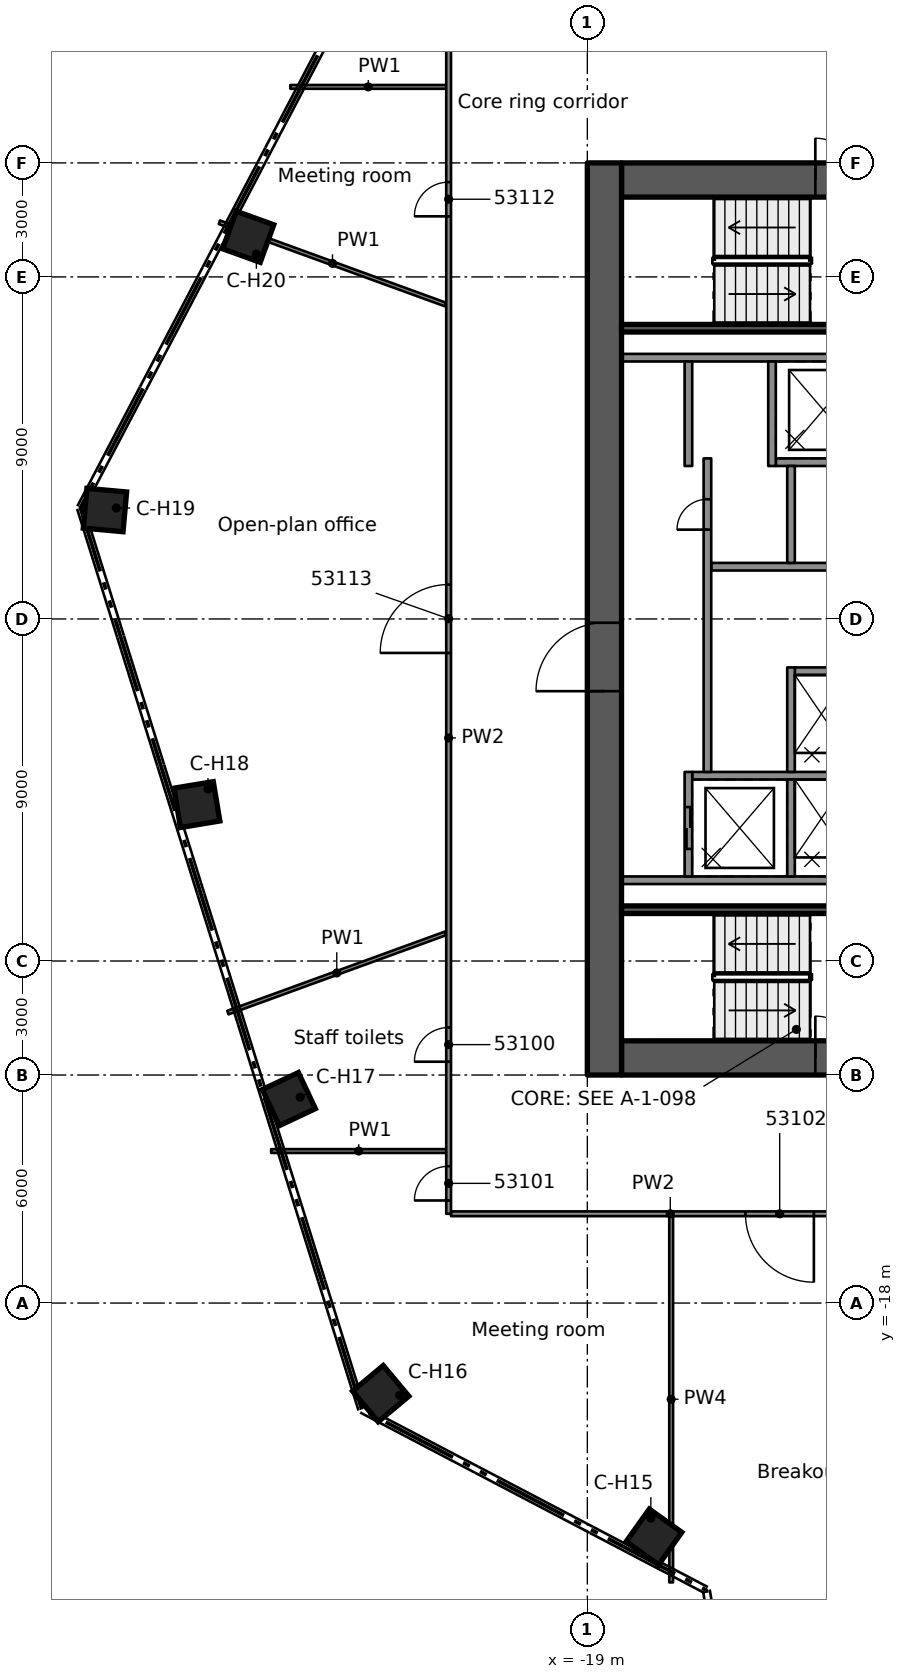
"""IFC4 building model, lengths in metres.
Left out: names, types, materials, properties, quantities, classifications, styles, units other than length and angle.
Written with IfcOpenShell. Run it as: python <this file> out.ifc"""

import sys

from ifc_helpers import new_model, si_unit, direction, frame, frame_2d, origin, origin_2d, place, context, subcontext, project, spatial, rectangle, extrude, element, fill, save


model = new_model("IFC4")
c1 = context("Model", 3, precision=1e-05, world=origin(), true_north=direction((0.0, 1.0)))
c2 = subcontext(c1, "Body", "Model", "MODEL_VIEW")
j1 = project(units=[si_unit("LENGTHUNIT", "METRE"), si_unit("PLANEANGLEUNIT", "RADIAN")], contexts=[c1])
p1 = place(None, origin())
s1 = spatial("IfcSite", under=j1, at=p1, CompositionType="ELEMENT")
p2 = place(p1, origin())
s2 = spatial("IfcBuilding", under=s1, at=p2, CompositionType="ELEMENT")
p3 = place(p2, frame((0.0, 0.0, 267.5)))
s3 = spatial("IfcBuildingStorey", under=s2, at=p3, CompositionType="ELEMENT", Elevation=267.5)
p4 = place(p3, frame((-18.1, 11.55, 0.0), z_axis=(0.0, 0.0, 1.0), x_axis=(1.0, 0.0, 0.0)))
e1 = element("IfcWall", 1, at=p4, inside=s3, PredefinedType="SHEAR", context=c2, shape_type="SweptSolid", body=[
    extrude(rectangle(XDim=9.2, YDim=0.9, at=frame_2d((4.6, 0.0))), origin(), (0.0, 0.0, 1.0), 3.5),
])
p5 = place(p4, frame((7.25, 0.0, 0.0)))
e2 = element("IfcOpeningElement", 2, at=p5, cuts=e1, PredefinedType="OPENING", context=c2, shape_type="SweptSolid", body=[
    extrude(rectangle(XDim=1.1, YDim=2.1, at=frame_2d((0.55, 1.05))), frame((0.0, 0.46, 0.0), z_axis=(0.0, -1.0, 0.0), x_axis=(1.0, 0.0, 0.0)), (0.0, 0.0, 1.0), 0.92),
])
p6 = place(p4, frame((5.1, 0.0, 0.0)))
e3 = element("IfcOpeningElement", 3, at=p6, cuts=e1, PredefinedType="OPENING", context=c2, shape_type="SweptSolid", body=[
    extrude(rectangle(XDim=1.1, YDim=2.1, at=frame_2d((0.55, 1.05))), frame((0.0, 0.46, 0.0), z_axis=(0.0, -1.0, 0.0), x_axis=(1.0, 0.0, 0.0)), (0.0, 0.0, 1.0), 0.92),
])
p7 = place(p3, frame((-18.1, -11.55, 0.0), z_axis=(0.0, 0.0, 1.0), x_axis=(1.0, 0.0, 0.0)))
e4 = element("IfcWall", 4, at=p7, inside=s3, PredefinedType="SHEAR", context=c2, shape_type="SweptSolid", body=[
    extrude(rectangle(XDim=9.2, YDim=0.9, at=frame_2d((4.6, 0.0))), origin(), (0.0, 0.0, 1.0), 3.5),
])
p8 = place(p7, frame((6.9, 0.0, 0.0)))
e5 = element("IfcOpeningElement", 5, at=p8, cuts=e4, PredefinedType="OPENING", context=c2, shape_type="SweptSolid", body=[
    extrude(rectangle(XDim=1.8, YDim=2.1, at=frame_2d((0.9, 1.05))), frame((0.0, 0.46, 0.0), z_axis=(0.0, -1.0, 0.0), x_axis=(1.0, 0.0, 0.0)), (0.0, 0.0, 1.0), 0.92),
])
p9 = place(p7, frame((5.1, 0.0, 0.0)))
e6 = element("IfcOpeningElement", 6, at=p9, cuts=e4, PredefinedType="OPENING", context=c2, shape_type="SweptSolid", body=[
    extrude(rectangle(XDim=1.1, YDim=2.1, at=frame_2d((0.55, 1.05))), frame((0.0, 0.46, 0.0), z_axis=(0.0, -1.0, 0.0), x_axis=(1.0, 0.0, 0.0)), (0.0, 0.0, 1.0), 0.92),
])
p10 = place(p3, frame((-18.55, -12.0, 0.0), z_axis=(0.0, 0.0, 1.0), x_axis=(0.0, 1.0, 0.0)))
e7 = element("IfcWall", 7, at=p10, inside=s3, PredefinedType="SHEAR", context=c2, shape_type="SweptSolid", body=[
    extrude(rectangle(XDim=24.0, YDim=0.9, at=frame_2d((12.0, 0.0))), origin(), (0.0, 0.0, 1.0), 3.5),
])
p11 = place(p10, frame((10.1, 0.0, 0.0)))
e8 = element("IfcOpeningElement", 8, at=p11, cuts=e7, PredefinedType="OPENING", context=c2, shape_type="SweptSolid", body=[
    extrude(rectangle(XDim=1.8, YDim=2.1, at=frame_2d((0.9, 1.05))), frame((0.0, 0.46, 0.0), z_axis=(0.0, -1.0, 0.0), x_axis=(1.0, 0.0, 0.0)), (0.0, 0.0, 1.0), 0.92),
])
for number, where, z_axis, x_axis in (
    (9, (-17.246, -24.154, 0.0), (0.0, 0.0, 1.0), (-0.581, -0.814, 0.0)),
    (10, (-24.437, -20.384, 0.0), (0.0, 0.0, 1.0), (-0.768, -0.641, 0.0)),
    (11, (-26.855, -12.634, 0.0), (0.0, 0.0, 1.0), (-0.905, -0.426, 0.0)),
    (12, (-29.274, -4.884, 0.0), (0.0, 0.0, 1.0), (-0.986, -0.165, 0.0)),
    (13, (-31.693, 2.866, 0.0), (0.0, 0.0, 1.0), (-0.996, 0.09, 0.0)),
    (14, (-27.923, 10.056, 0.0), (0.0, 0.0, 1.0), (-0.941, 0.339, 0.0)),
):
    element("IfcColumn", number, at=place(p3, frame(where, z_axis=z_axis, x_axis=x_axis)), inside=s3, PredefinedType="COLUMN", context=c2, shape_type="SweptSolid", body=[
        extrude(rectangle(XDim=1.05, YDim=1.05, at=origin_2d()), origin(), (0.0, 0.0, 1.0), 3.5),
    ])
for number, where, z_axis, x_axis in (
    (15, (-11.54, 6.875, 0.0), (0.0, 0.0, 1.0), (-1.0, 0.0, 0.0)),
    (16, (-11.54, -6.875, 0.0), (0.0, 0.0, 1.0), (-1.0, 0.0, 0.0)),
):
    element("IfcWall", number, at=place(p3, frame(where, z_axis=z_axis, x_axis=x_axis)), inside=s3, PredefinedType="SOLIDWALL", context=c2, shape_type="SweptSolid", body=[
        extrude(rectangle(XDim=6.56, YDim=0.2, at=frame_2d((3.28, 0.0))), origin(), (0.0, 0.0, 1.0), 3.05),
    ])
p12 = place(p3, frame((-11.54, -4.125, 0.0), z_axis=(0.0, 0.0, 1.0), x_axis=(-1.0, 0.0, 0.0)))
e17 = element("IfcWall", 17, at=p12, inside=s3, PredefinedType="SOLIDWALL", context=c2, shape_type="SweptSolid", body=[
    extrude(rectangle(XDim=4.7, YDim=0.2, at=frame_2d((2.35, 0.0))), origin(), (0.0, 0.0, 1.0), 3.05),
])
p13 = place(p3, frame((-11.54, -1.375, 0.0), z_axis=(0.0, 0.0, 1.0), x_axis=(-1.0, 0.0, 0.0)))
e18 = element("IfcWall", 18, at=p13, inside=s3, PredefinedType="SOLIDWALL", context=c2, shape_type="SweptSolid", body=[
    extrude(rectangle(XDim=2.0, YDim=0.2, at=frame_2d((1.0, 0.0))), origin(), (0.0, 0.0, 1.0), 3.05),
])
p14 = place(p3, frame((-11.54, 1.375, 0.0), z_axis=(0.0, 0.0, 1.0), x_axis=(-1.0, 0.0, 0.0)))
e19 = element("IfcWall", 19, at=p14, inside=s3, PredefinedType="SOLIDWALL", context=c2, shape_type="SweptSolid", body=[
    extrude(rectangle(XDim=4.2, YDim=0.2, at=frame_2d((2.1, 0.0))), origin(), (0.0, 0.0, 1.0), 3.05),
])
p15 = place(p3, frame((-11.54, 4.125, 0.0), z_axis=(0.0, 0.0, 1.0), x_axis=(-1.0, 0.0, 0.0)))
e20 = element("IfcWall", 20, at=p15, inside=s3, PredefinedType="SOLIDWALL", context=c2, shape_type="SweptSolid", body=[
    extrude(rectangle(XDim=2.5, YDim=0.2, at=frame_2d((1.25, 0.0))), origin(), (0.0, 0.0, 1.0), 3.05),
])
p16 = place(p3, frame((-13.64, -6.775, 0.0), z_axis=(0.0, 0.0, 1.0), x_axis=(0.0, 1.0, 0.0)))
e21 = element("IfcWall", 21, at=p16, inside=s3, PredefinedType="SOLIDWALL", context=c2, shape_type="SweptSolid", body=[
    extrude(rectangle(XDim=2.55, YDim=0.2, at=frame_2d((1.275, 0.0))), origin(), (0.0, 0.0, 1.0), 3.05),
])
p17 = place(p3, frame((-13.64, -4.025, 0.0), z_axis=(0.0, 0.0, 1.0), x_axis=(0.0, 1.0, 0.0)))
e22 = element("IfcWall", 22, at=p17, inside=s3, PredefinedType="SOLIDWALL", context=c2, shape_type="SweptSolid", body=[
    extrude(rectangle(XDim=2.75, YDim=0.2, at=frame_2d((1.375, 0.0))), origin(), (0.0, 0.0, 1.0), 3.05),
])
p18 = place(p3, frame((-13.64, 1.475, 0.0), z_axis=(0.0, 0.0, 1.0), x_axis=(0.0, 1.0, 0.0)))
e23 = element("IfcWall", 23, at=p18, inside=s3, PredefinedType="SOLIDWALL", context=c2, shape_type="SweptSolid", body=[
    extrude(rectangle(XDim=2.55, YDim=0.2, at=frame_2d((1.275, 0.0))), origin(), (0.0, 0.0, 1.0), 3.05),
])
p19 = place(p3, frame((-14.14, 4.025, 0.0), z_axis=(0.0, 0.0, 1.0), x_axis=(0.0, 1.0, 0.0)))
e24 = element("IfcWall", 24, at=p19, inside=s3, PredefinedType="SOLIDWALL", context=c2, shape_type="SweptSolid", body=[
    extrude(rectangle(XDim=2.75, YDim=0.2, at=frame_2d((1.375, 0.0))), origin(), (0.0, 0.0, 1.0), 3.05),
])
p20 = place(p3, frame((-16.34, -6.775, 0.0), z_axis=(0.0, 0.0, 1.0), x_axis=(0.0, 1.0, 0.0)))
e25 = element("IfcWall", 25, at=p20, inside=s3, PredefinedType="SOLIDWALL", context=c2, shape_type="SweptSolid", body=[
    extrude(rectangle(XDim=2.75, YDim=0.2, at=frame_2d((1.375, 0.0))), origin(), (0.0, 0.0, 1.0), 3.05),
])
p21 = place(p20, frame((0.725, 0.0, 0.0)))
e26 = element("IfcOpeningElement", 26, at=p21, cuts=e25, PredefinedType="OPENING", context=c2, shape_type="SweptSolid", body=[
    extrude(rectangle(XDim=1.1, YDim=2.1, at=frame_2d((0.55, 1.05))), frame((0.0, 0.11, 0.0), z_axis=(0.0, -1.0, 0.0), x_axis=(1.0, 0.0, 0.0)), (0.0, 0.0, 1.0), 0.22),
])
p22 = place(p3, frame((-15.84, -4.025, 0.0), z_axis=(0.0, 0.0, 1.0), x_axis=(0.0, 1.0, 0.0)))
e27 = element("IfcWall", 27, at=p22, inside=s3, PredefinedType="SOLIDWALL", context=c2, shape_type="SweptSolid", body=[
    extrude(rectangle(XDim=8.25, YDim=0.2, at=frame_2d((4.125, 0.0))), origin(), (0.0, 0.0, 1.0), 3.05),
])
p23 = place(p22, frame((6.375, 0.0, 0.0)))
e28 = element("IfcOpeningElement", 28, at=p23, cuts=e27, PredefinedType="OPENING", context=c2, shape_type="SweptSolid", body=[
    extrude(rectangle(XDim=0.8, YDim=2.1, at=frame_2d((0.4, 1.05))), frame((0.0, 0.11, 0.0), z_axis=(0.0, -1.0, 0.0), x_axis=(1.0, 0.0, 0.0)), (0.0, 0.0, 1.0), 0.22),
])
p24 = place(p3, frame((-16.34, 4.025, 0.0), z_axis=(0.0, 0.0, 1.0), x_axis=(0.0, 1.0, 0.0)))
e29 = element("IfcWall", 29, at=p24, inside=s3, PredefinedType="SOLIDWALL", context=c2, shape_type="SweptSolid", body=[
    extrude(rectangle(XDim=2.75, YDim=0.2, at=frame_2d((1.375, 0.0))), origin(), (0.0, 0.0, 1.0), 3.05),
])
for number, where, z_axis, x_axis in (
    (30, (-11.54, 7.65, 0.0), (0.0, 0.0, 1.0), (-1.0, 0.0, 0.0)),
    (31, (-11.54, -7.65, 0.0), (0.0, 0.0, 1.0), (-1.0, 0.0, 0.0)),
):
    element("IfcWall", number, at=place(p3, frame(where, z_axis=z_axis, x_axis=x_axis)), inside=s3, PredefinedType="SOLIDWALL", context=c2, shape_type="SweptSolid", body=[
        extrude(rectangle(XDim=6.56, YDim=0.2, at=frame_2d((3.28, 0.0))), origin(), (0.0, 0.0, 1.0), 3.05),
    ])
p25 = place(p3, frame((-28.682, 10.439, 0.0), z_axis=(0.0, 0.0, 1.0), x_axis=(0.939707861785, -0.341978266121, 0.0)))
e32 = element("IfcWall", 32, at=p25, inside=s3, PredefinedType="PARTITIONING", context=c2, shape_type="SweptSolid", body=[
    extrude(rectangle(XDim=6.334, YDim=0.1, at=frame_2d((3.167, 0.0))), origin(), (0.0, 0.0, 1.0), 3.03),
])
p26 = place(p3, frame((-11.047, -15.651, 0.0), z_axis=(0.0, 0.0, 1.0), x_axis=(-1.0, 0.0, 0.0)))
e33 = element("IfcWall", 33, at=p26, inside=s3, PredefinedType="PARTITIONING", context=c2, shape_type="SweptSolid", body=[
    extrude(rectangle(XDim=11.54, YDim=0.125, at=frame_2d((5.77, 0.0))), origin(), (0.0, 0.0, 1.0), 3.03),
])
p27 = place(p26, frame((1.992, 0.0, 0.0)))
e34 = element("IfcOpeningElement", 34, at=p27, cuts=e33, PredefinedType="OPENING", context=c2, shape_type="SweptSolid", body=[
    extrude(rectangle(XDim=1.8, YDim=2.1, at=frame_2d((0.9, 1.05))), frame((0.0, 0.073, 0.0), z_axis=(0.0, -1.0, 0.0), x_axis=(1.0, 0.0, 0.0)), (0.0, 0.0, 1.0), 0.145),
])
p28 = place(p3, frame((-27.32, -14.0, 0.0), z_axis=(0.0, 0.0, 1.0), x_axis=(1.0, 0.0, 0.0)))
e35 = element("IfcWall", 35, at=p28, inside=s3, PredefinedType="PARTITIONING", context=c2, shape_type="SweptSolid", body=[
    extrude(rectangle(XDim=4.608, YDim=0.1, at=frame_2d((2.304, 0.0))), origin(), (0.0, 0.0, 1.0), 3.03),
])
p29 = place(p3, frame((-26.815, 14.0, 0.0), z_axis=(0.0, 0.0, 1.0), x_axis=(1.0, 0.0, 0.0)))
e36 = element("IfcWall", 36, at=p29, inside=s3, PredefinedType="PARTITIONING", context=c2, shape_type="SweptSolid", body=[
    extrude(rectangle(XDim=4.103, YDim=0.1, at=frame_2d((2.052, 0.0))), origin(), (0.0, 0.0, 1.0), 3.03),
])
p30 = place(p3, frame((-28.457, -10.357, 0.0), z_axis=(0.0, 0.0, 1.0), x_axis=(0.939718545013, 0.341948908698, 0.0)))
e37 = element("IfcWall", 37, at=p30, inside=s3, PredefinedType="PARTITIONING", context=c2, shape_type="SweptSolid", body=[
    extrude(rectangle(XDim=6.094, YDim=0.1, at=frame_2d((3.047, 0.0))), origin(), (0.0, 0.0, 1.0), 3.03),
])
p31 = place(p3, frame((-16.794, -25.35, 0.0), z_axis=(0.0, 0.0, 1.0), x_axis=(0.0, 1.0, 0.0)))
e38 = element("IfcWall", 38, at=p31, inside=s3, PredefinedType="PARTITIONING", context=c2, shape_type="SweptSolid", body=[
    extrude(rectangle(XDim=9.637, YDim=0.1, at=frame_2d((4.819, 0.0))), origin(), (0.0, 0.0, 1.0), 2.419),
])
p32 = place(p3, frame((-22.65, -15.651, 0.0), z_axis=(0.0, 0.0, 1.0), x_axis=(0.0, 1.0, 0.0)))
e39 = element("IfcWall", 39, at=p32, inside=s3, PredefinedType="PARTITIONING", context=c2, shape_type="SweptSolid", body=[
    extrude(rectangle(XDim=31.302, YDim=0.125, at=frame_2d((15.651, 0.0))), origin(), (0.0, 0.0, 1.0), 3.03),
])
p33 = place(p32, frame((4.001, 0.0, 0.0)))
e40 = element("IfcOpeningElement", 40, at=p33, cuts=e39, PredefinedType="OPENING", context=c2, shape_type="SweptSolid", body=[
    extrude(rectangle(XDim=0.9, YDim=2.1, at=frame_2d((0.45, 1.05))), frame((0.0, 0.073, 0.0), z_axis=(0.0, -1.0, 0.0), x_axis=(1.0, 0.0, 0.0)), (0.0, 0.0, 1.0), 0.145),
])
p34 = place(p32, frame((0.35, 0.0, 0.0)))
e41 = element("IfcOpeningElement", 41, at=p34, cuts=e39, PredefinedType="OPENING", context=c2, shape_type="SweptSolid", body=[
    extrude(rectangle(XDim=0.9, YDim=2.1, at=frame_2d((0.45, 1.05))), frame((0.0, 0.073, 0.0), z_axis=(0.0, -1.0, 0.0), x_axis=(1.0, 0.0, 0.0)), (0.0, 0.0, 1.0), 0.145),
])
p35 = place(p32, frame((26.245, 0.0, 0.0)))
e42 = element("IfcOpeningElement", 42, at=p35, cuts=e39, PredefinedType="OPENING", context=c2, shape_type="SweptSolid", body=[
    extrude(rectangle(XDim=0.9, YDim=2.1, at=frame_2d((0.45, 1.05))), frame((0.0, 0.073, 0.0), z_axis=(0.0, -1.0, 0.0), x_axis=(1.0, 0.0, 0.0)), (0.0, 0.0, 1.0), 0.145),
])
p36 = place(p32, frame((14.757, 0.0, 0.0)))
e43 = element("IfcOpeningElement", 43, at=p36, cuts=e39, PredefinedType="OPENING", context=c2, shape_type="SweptSolid", body=[
    extrude(rectangle(XDim=1.8, YDim=2.1, at=frame_2d((0.9, 1.05))), frame((0.0, 0.073, 0.0), z_axis=(0.0, -1.0, 0.0), x_axis=(1.0, 0.0, 0.0)), (0.0, 0.0, 1.0), 0.145),
])
p37 = place(p21, origin())
e44 = element("IfcDoor", 44, at=p37, inside=s3, OperationType="DOUBLE_DOOR_SLIDING", PredefinedType="DOOR", context=c2, shape_type="SweptSolid", body=[
    extrude(rectangle(XDim=1.1, YDim=2.1, at=frame_2d((0.55, 1.05))), frame((0.0, 0.025, 0.0), z_axis=(0.0, -1.0, 0.0), x_axis=(1.0, 0.0, 0.0)), (0.0, 0.0, 1.0), 0.05),
])
fill(e26, e44)
p38 = place(p23, origin())
e45 = element("IfcDoor", 45, at=p38, inside=s3, OperationType="SINGLE_SWING_LEFT", PredefinedType="DOOR", context=c2, shape_type="SweptSolid", body=[
    extrude(rectangle(XDim=0.8, YDim=2.1, at=frame_2d((0.4, 1.05))), frame((0.0, 0.025, 0.0), z_axis=(0.0, -1.0, 0.0), x_axis=(1.0, 0.0, 0.0)), (0.0, 0.0, 1.0), 0.05),
])
fill(e28, e45)
p39 = place(p11, origin())
e46 = element("IfcDoor", 46, at=p39, inside=s3, OperationType="SINGLE_SWING_LEFT", PredefinedType="DOOR", context=c2, shape_type="SweptSolid", body=[
    extrude(rectangle(XDim=1.8, YDim=2.1, at=frame_2d((0.9, 1.05))), frame((0.0, 0.025, 0.0), z_axis=(0.0, -1.0, 0.0), x_axis=(1.0, 0.0, 0.0)), (0.0, 0.0, 1.0), 0.05),
])
fill(e8, e46)
p40 = place(p6, origin())
e47 = element("IfcDoor", 47, at=p40, inside=s3, OperationType="SINGLE_SWING_RIGHT", PredefinedType="DOOR", context=c2, shape_type="SweptSolid", body=[
    extrude(rectangle(XDim=1.1, YDim=2.1, at=frame_2d((0.55, 1.05))), frame((0.0, 0.025, 0.0), z_axis=(0.0, -1.0, 0.0), x_axis=(1.0, 0.0, 0.0)), (0.0, 0.0, 1.0), 0.05),
])
fill(e3, e47)
p41 = place(p9, origin())
e48 = element("IfcDoor", 48, at=p41, inside=s3, OperationType="SINGLE_SWING_RIGHT", PredefinedType="DOOR", context=c2, shape_type="SweptSolid", body=[
    extrude(rectangle(XDim=1.1, YDim=2.1, at=frame_2d((0.55, 1.05))), frame((0.0, 0.025, 0.0), z_axis=(0.0, -1.0, 0.0), x_axis=(1.0, 0.0, 0.0)), (0.0, 0.0, 1.0), 0.05),
])
fill(e6, e48)
p42 = place(p33, origin())
e49 = element("IfcDoor", 49, at=p42, inside=s3, OperationType="SINGLE_SWING_LEFT", PredefinedType="DOOR", context=c2, shape_type="SweptSolid", body=[
    extrude(rectangle(XDim=0.9, YDim=2.1, at=frame_2d((0.45, 1.05))), frame((0.0, 0.025, 0.0), z_axis=(0.0, -1.0, 0.0), x_axis=(1.0, 0.0, 0.0)), (0.0, 0.0, 1.0), 0.05),
])
fill(e40, e49)
p43 = place(p34, origin())
e50 = element("IfcDoor", 50, at=p43, inside=s3, OperationType="SINGLE_SWING_LEFT", PredefinedType="DOOR", context=c2, shape_type="SweptSolid", body=[
    extrude(rectangle(XDim=0.9, YDim=2.1, at=frame_2d((0.45, 1.05))), frame((0.0, 0.025, 0.0), z_axis=(0.0, -1.0, 0.0), x_axis=(1.0, 0.0, 0.0)), (0.0, 0.0, 1.0), 0.05),
])
fill(e41, e50)
p44 = place(p27, origin())
e51 = element("IfcDoor", 51, at=p44, inside=s3, OperationType="DOUBLE_DOOR_SINGLE_SWING", PredefinedType="DOOR", context=c2, shape_type="SweptSolid", body=[
    extrude(rectangle(XDim=1.8, YDim=2.1, at=frame_2d((0.9, 1.05))), frame((0.0, 0.025, 0.0), z_axis=(0.0, -1.0, 0.0), x_axis=(1.0, 0.0, 0.0)), (0.0, 0.0, 1.0), 0.05),
])
fill(e34, e51)
p45 = place(p35, origin())
e52 = element("IfcDoor", 52, at=p45, inside=s3, OperationType="SINGLE_SWING_RIGHT", PredefinedType="DOOR", context=c2, shape_type="SweptSolid", body=[
    extrude(rectangle(XDim=0.9, YDim=2.1, at=frame_2d((0.45, 1.05))), frame((0.0, 0.025, 0.0), z_axis=(0.0, -1.0, 0.0), x_axis=(1.0, 0.0, 0.0)), (0.0, 0.0, 1.0), 0.05),
])
fill(e42, e52)
p46 = place(p36, origin())
e53 = element("IfcDoor", 53, at=p46, inside=s3, OperationType="DOUBLE_DOOR_SINGLE_SWING", PredefinedType="DOOR", context=c2, shape_type="SweptSolid", body=[
    extrude(rectangle(XDim=1.8, YDim=2.1, at=frame_2d((0.9, 1.05))), frame((0.0, 0.025, 0.0), z_axis=(0.0, -1.0, 0.0), x_axis=(1.0, 0.0, 0.0)), (0.0, 0.0, 1.0), 0.05),
])
fill(e43, e53)
save(model, sys.argv[1])
